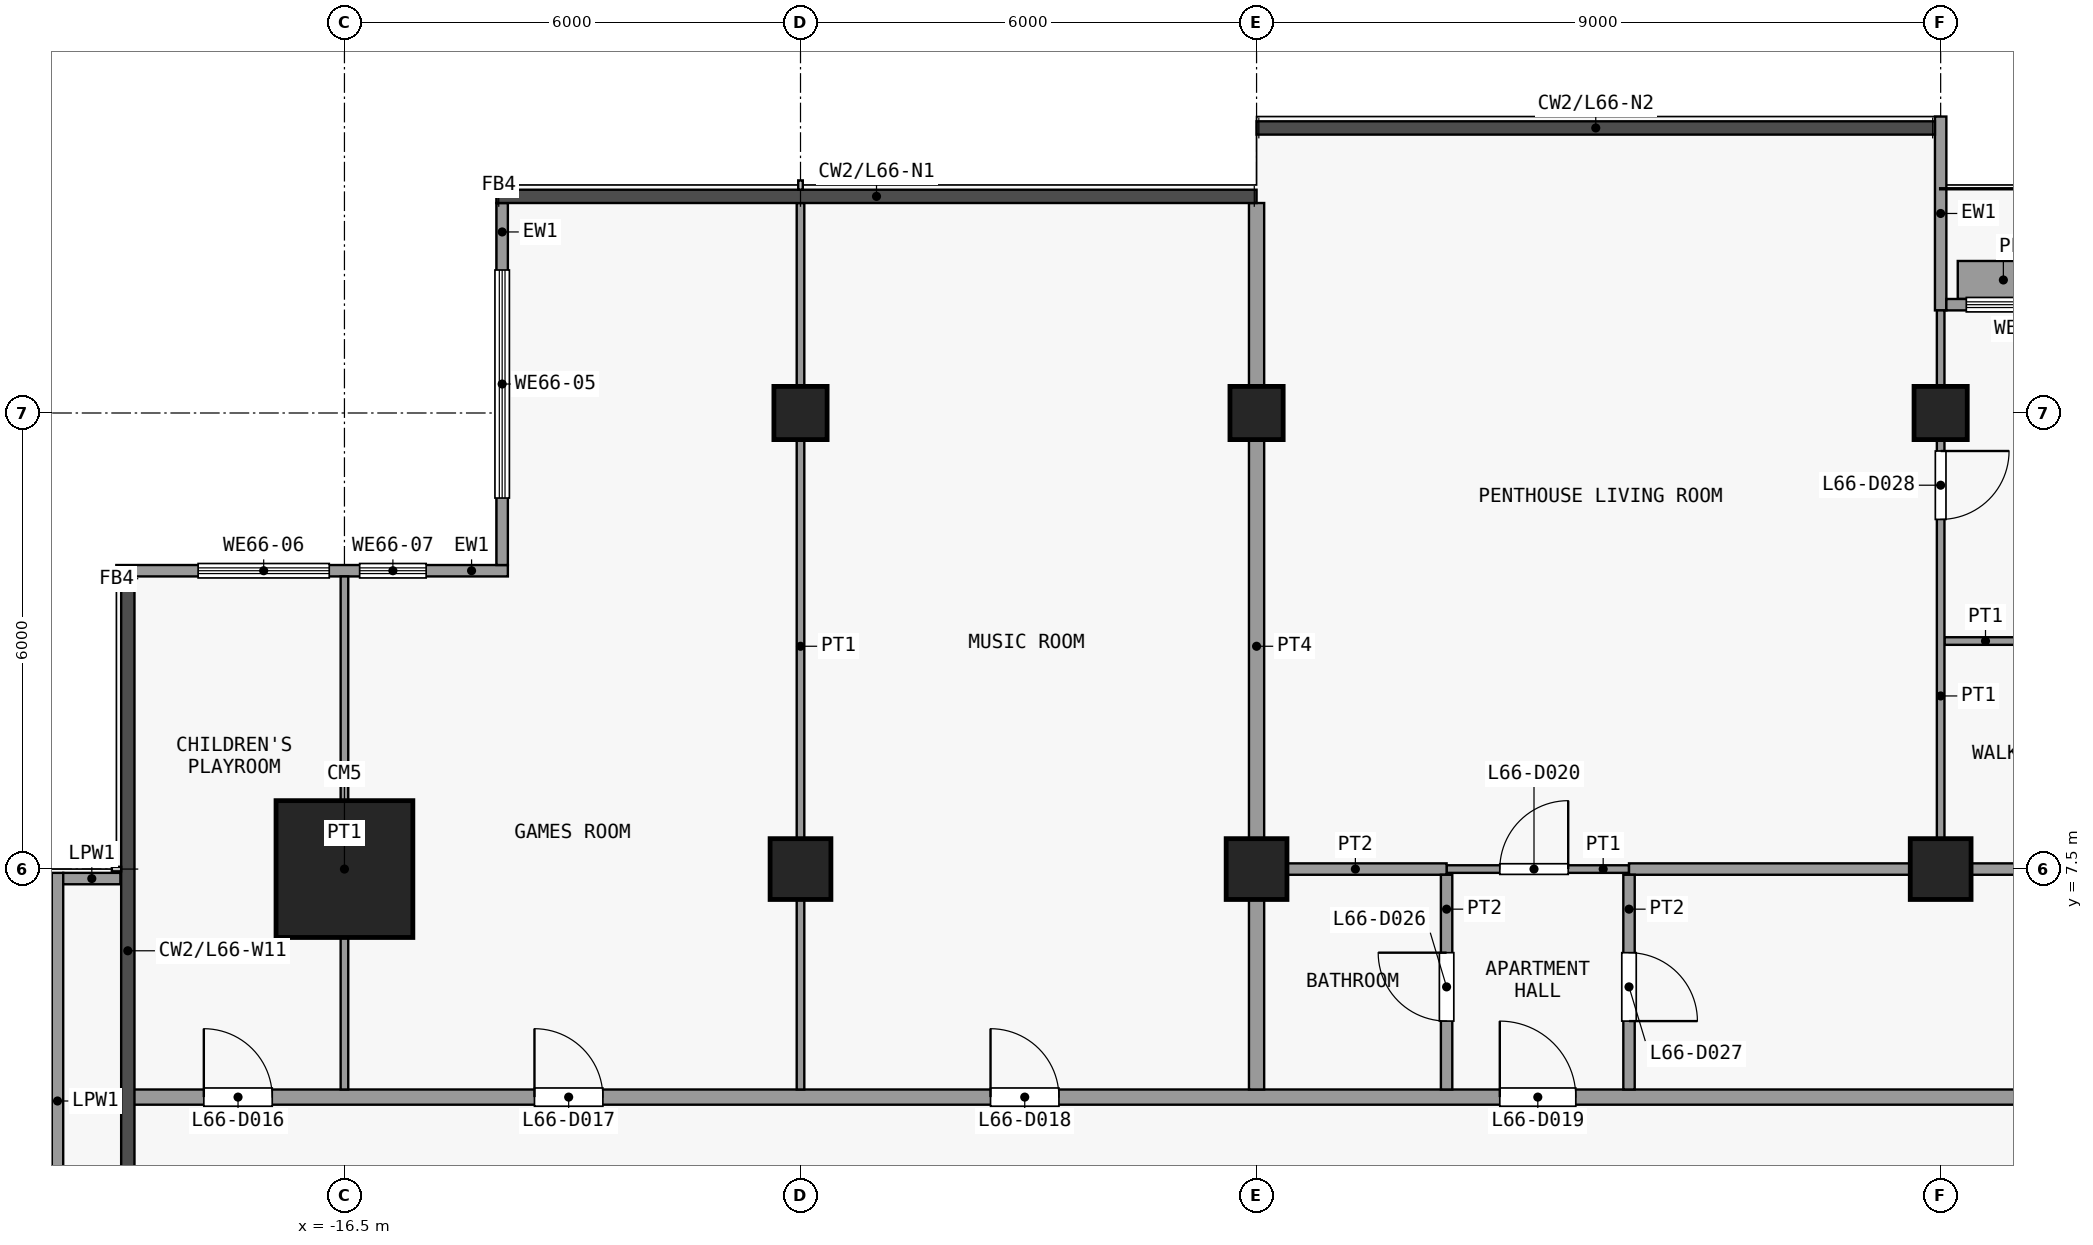
"""IFC4 building model, lengths in metres.
Left out: names, types, materials, properties, quantities, classifications, styles, units other than length and angle.
Written with IfcOpenShell. Run it as: python <this file> out.ifc"""

import sys

from ifc_helpers import new_model, si_unit, direction, frame, frame_2d, origin, origin_2d, place, context, subcontext, project, spatial, rectangle, extrude, element, fill, save


model = new_model("IFC4")
c1 = context("Model", 3, precision=1e-05, world=origin(), true_north=direction((0.0, 1.0)))
c2 = subcontext(c1, "Body", "Model", "MODEL_VIEW")
j1 = project(units=[si_unit("LENGTHUNIT", "METRE"), si_unit("PLANEANGLEUNIT", "RADIAN")], contexts=[c1])
p1 = place(None, origin())
s1 = spatial("IfcSite", under=j1, at=p1, CompositionType="ELEMENT")
p2 = place(p1, origin())
s2 = spatial("IfcBuilding", under=s1, at=p2, CompositionType="ELEMENT")
p3 = place(p2, frame((0.0, 0.0, 262.7)))
s3 = spatial("IfcBuildingStorey", under=s2, at=p3, CompositionType="ELEMENT", Elevation=262.7)
p4 = place(p3, frame((-16.5, 7.5, 0.0), z_axis=(0.0, 0.0, 1.0), x_axis=(1.0, 0.0, 0.0)))
e1 = element("IfcColumn", 1, at=p4, inside=s3, PredefinedType="COLUMN", context=c2, shape_type="SweptSolid", body=[
    extrude(rectangle(XDim=1.8, YDim=1.8, at=origin_2d()), origin(), (0.0, 0.0, 1.0), 3.6),
])
p5 = place(p3, frame((-10.5, 7.5, 0.0), z_axis=(0.0, 0.0, 1.0), x_axis=(1.0, 0.0, 0.0)))
e2 = element("IfcColumn", 2, at=p5, inside=s3, PredefinedType="COLUMN", context=c2, shape_type="SweptSolid", body=[
    extrude(rectangle(XDim=0.8, YDim=0.8, at=origin_2d()), origin(), (0.0, 0.0, 1.0), 3.6),
])
p6 = place(p3, frame((-10.5, 13.5, 0.0), z_axis=(0.0, 0.0, 1.0), x_axis=(1.0, 0.0, 0.0)))
e3 = element("IfcColumn", 3, at=p6, inside=s3, PredefinedType="COLUMN", context=c2, shape_type="SweptSolid", body=[
    extrude(rectangle(XDim=0.7, YDim=0.7, at=origin_2d()), origin(), (0.0, 0.0, 1.0), 3.6),
])
p7 = place(p3, frame((-4.5, 7.5, 0.0), z_axis=(0.0, 0.0, 1.0), x_axis=(1.0, 0.0, 0.0)))
e4 = element("IfcColumn", 4, at=p7, inside=s3, PredefinedType="COLUMN", context=c2, shape_type="SweptSolid", body=[
    extrude(rectangle(XDim=0.8, YDim=0.8, at=origin_2d()), origin(), (0.0, 0.0, 1.0), 3.6),
])
p8 = place(p3, frame((-4.5, 13.5, 0.0), z_axis=(0.0, 0.0, 1.0), x_axis=(1.0, 0.0, 0.0)))
e5 = element("IfcColumn", 5, at=p8, inside=s3, PredefinedType="COLUMN", context=c2, shape_type="SweptSolid", body=[
    extrude(rectangle(XDim=0.7, YDim=0.7, at=origin_2d()), origin(), (0.0, 0.0, 1.0), 3.6),
])
p9 = place(p3, frame((4.5, 7.5, 0.0), z_axis=(0.0, 0.0, 1.0), x_axis=(1.0, 0.0, 0.0)))
e6 = element("IfcColumn", 6, at=p9, inside=s3, PredefinedType="COLUMN", context=c2, shape_type="SweptSolid", body=[
    extrude(rectangle(XDim=0.8, YDim=0.8, at=origin_2d()), origin(), (0.0, 0.0, 1.0), 3.6),
])
p10 = place(p3, frame((4.5, 13.5, 0.0), z_axis=(0.0, 0.0, 1.0), x_axis=(1.0, 0.0, 0.0)))
e7 = element("IfcColumn", 7, at=p10, inside=s3, PredefinedType="COLUMN", context=c2, shape_type="SweptSolid", body=[
    extrude(rectangle(XDim=0.7, YDim=0.7, at=origin_2d()), origin(), (0.0, 0.0, 1.0), 3.6),
])
p11 = place(p3, frame((-14.425, 11.5, 0.0), z_axis=(0.0, 0.0, 1.0), x_axis=(0.0, 1.0, 0.0)))
e8 = element("IfcWall", 8, at=p11, inside=s3, PredefinedType="SOLIDWALL", context=c2, shape_type="SweptSolid", body=[
    extrude(rectangle(XDim=4.762, YDim=0.15, at=frame_2d((2.381, 0.0))), origin(), (0.0, 0.0, 1.0), 3.3),
])
p12 = place(p11, frame((0.881, 0.0, 0.9)))
e9 = element("IfcOpeningElement", 9, at=p12, cuts=e8, PredefinedType="OPENING", context=c2, shape_type="SweptSolid", body=[
    extrude(rectangle(XDim=3.0, YDim=2.4, at=frame_2d((1.5, 1.2))), frame((0.0, 0.085, 0.0), z_axis=(0.0, -1.0, 0.0), x_axis=(1.0, 0.0, 0.0)), (0.0, 0.0, 1.0), 0.17),
])
p13 = place(p3, frame((-19.5, 11.425, 0.0), z_axis=(0.0, 0.0, 1.0), x_axis=(1.0, 0.0, 0.0)))
e10 = element("IfcWall", 10, at=p13, inside=s3, PredefinedType="SOLIDWALL", context=c2, shape_type="SweptSolid", body=[
    extrude(rectangle(XDim=5.15, YDim=0.15, at=frame_2d((2.575, 0.0))), origin(), (0.0, 0.0, 1.0), 3.3),
])
p14 = place(p13, frame((1.075, 0.0, 0.9)))
e11 = element("IfcOpeningElement", 11, at=p14, cuts=e10, PredefinedType="OPENING", context=c2, shape_type="SweptSolid", body=[
    extrude(rectangle(XDim=1.725, YDim=2.4, at=frame_2d((0.863, 1.2))), frame((0.0, 0.085, 0.0), z_axis=(0.0, -1.0, 0.0), x_axis=(1.0, 0.0, 0.0)), (0.0, 0.0, 1.0), 0.17),
])
p15 = place(p13, frame((3.2, 0.0, 0.9)))
e12 = element("IfcOpeningElement", 12, at=p15, cuts=e10, PredefinedType="OPENING", context=c2, shape_type="SweptSolid", body=[
    extrude(rectangle(XDim=0.875, YDim=2.4, at=frame_2d((0.438, 1.2))), frame((0.0, 0.085, 0.0), z_axis=(0.0, -1.0, 0.0), x_axis=(1.0, 0.0, 0.0)), (0.0, 0.0, 1.0), 0.17),
])
p16 = place(p3, frame((4.5, 14.85, 0.0), z_axis=(0.0, 0.0, 1.0), x_axis=(0.0, 1.0, 0.0)))
e13 = element("IfcWall", 13, at=p16, inside=s3, PredefinedType="SOLIDWALL", context=c2, shape_type="SweptSolid", body=[
    extrude(rectangle(XDim=2.55, YDim=0.15, at=frame_2d((1.275, 0.0))), origin(), (0.0, 0.0, 1.0), 3.3),
])
p17 = place(p3, frame((4.575, 14.925, 0.0), z_axis=(0.0, 0.0, 1.0), x_axis=(1.0, 0.0, 0.0)))
e14 = element("IfcWall", 14, at=p17, inside=s3, PredefinedType="SOLIDWALL", context=c2, shape_type="SweptSolid", body=[
    extrude(rectangle(XDim=5.85, YDim=0.15, at=frame_2d((2.925, 0.0))), origin(), (0.0, 0.0, 1.0), 3.3),
])
p18 = place(p17, frame((2.325, 0.0, 0.0)))
e15 = element("IfcOpeningElement", 15, at=p18, cuts=e14, PredefinedType="OPENING", context=c2, shape_type="SweptSolid", body=[
    extrude(rectangle(XDim=1.2, YDim=2.4, at=frame_2d((0.6, 1.2))), frame((0.0, 0.085, 0.0), z_axis=(0.0, -1.0, 0.0), x_axis=(1.0, 0.0, 0.0)), (0.0, 0.0, 1.0), 0.17),
])
p19 = place(p17, frame((0.262, 0.0, 0.9)))
e16 = element("IfcOpeningElement", 16, at=p19, cuts=e14, PredefinedType="OPENING", context=c2, shape_type="SweptSolid", body=[
    extrude(rectangle(XDim=1.8, YDim=2.1, at=frame_2d((0.9, 1.05))), frame((0.0, 0.085, 0.0), z_axis=(0.0, -1.0, 0.0), x_axis=(1.0, 0.0, 0.0)), (0.0, 0.0, 1.0), 0.17),
])
p20 = place(p17, frame((3.788, 0.0, 0.9)))
e17 = element("IfcOpeningElement", 17, at=p20, cuts=e14, PredefinedType="OPENING", context=c2, shape_type="SweptSolid", body=[
    extrude(rectangle(XDim=1.8, YDim=2.1, at=frame_2d((0.9, 1.05))), frame((0.0, 0.085, 0.0), z_axis=(0.0, -1.0, 0.0), x_axis=(1.0, 0.0, 0.0)), (0.0, 0.0, 1.0), 0.17),
])
p21 = place(p3, frame((4.725, 15.25, 0.0), z_axis=(0.0, 0.0, 1.0), x_axis=(1.0, 0.0, 0.0)))
e18 = element("IfcWall", 18, at=p21, inside=s3, PredefinedType="USERDEFINED", context=c2, shape_type="SweptSolid", body=[
    extrude(rectangle(XDim=1.2, YDim=0.5, at=frame_2d((0.6, 0.0))), origin(), (0.0, 0.0, 1.0), 0.9),
])
p22 = place(p3, frame((-20.275, 1.448, 0.0), z_axis=(0.0, 0.0, 1.0), x_axis=(0.0, 1.0, 0.0)))
e19 = element("IfcWall", 19, at=p22, inside=s3, PredefinedType="PARAPET", context=c2, shape_type="SweptSolid", body=[
    extrude(rectangle(XDim=6.002, YDim=0.15, at=frame_2d((3.001, 0.0))), origin(), (0.0, 0.0, 1.0), 1.15),
])
p23 = place(p3, frame((-20.2, 7.375, 0.0), z_axis=(0.0, 0.0, 1.0), x_axis=(1.0, 0.0, 0.0)))
e20 = element("IfcWall", 20, at=p23, inside=s3, PredefinedType="PARAPET", context=c2, shape_type="SweptSolid", body=[
    extrude(rectangle(XDim=0.752, YDim=0.15, at=frame_2d((0.376, 0.0))), origin(), (0.0, 0.0, 1.0), 1.15),
])
p24 = place(p3, frame((-19.35, 4.5, 0.0), z_axis=(0.0, 0.0, 1.0), x_axis=(1.0, 0.0, 0.0)))
e21 = element("IfcWall", 21, at=p24, inside=s3, PredefinedType="PARTITIONING", context=c2, shape_type="SweptSolid", body=[
    extrude(rectangle(XDim=38.7, YDim=0.2, at=frame_2d((19.35, 0.0))), origin(), (0.0, 0.0, 1.0), 3.3),
])
p25 = place(p24, frame((1.0, 0.0, 0.0)))
e22 = element("IfcOpeningElement", 22, at=p25, cuts=e21, PredefinedType="OPENING", context=c2, shape_type="SweptSolid", body=[
    extrude(rectangle(XDim=0.9, YDim=2.1, at=frame_2d((0.45, 1.05))), frame((0.0, 0.11, 0.0), z_axis=(0.0, -1.0, 0.0), x_axis=(1.0, 0.0, 0.0)), (0.0, 0.0, 1.0), 0.22),
])
p26 = place(p24, frame((5.35, 0.0, 0.0)))
e23 = element("IfcOpeningElement", 23, at=p26, cuts=e21, PredefinedType="OPENING", context=c2, shape_type="SweptSolid", body=[
    extrude(rectangle(XDim=0.9, YDim=2.1, at=frame_2d((0.45, 1.05))), frame((0.0, 0.11, 0.0), z_axis=(0.0, -1.0, 0.0), x_axis=(1.0, 0.0, 0.0)), (0.0, 0.0, 1.0), 0.22),
])
p27 = place(p24, frame((11.35, 0.0, 0.0)))
e24 = element("IfcOpeningElement", 24, at=p27, cuts=e21, PredefinedType="OPENING", context=c2, shape_type="SweptSolid", body=[
    extrude(rectangle(XDim=0.9, YDim=2.1, at=frame_2d((0.45, 1.05))), frame((0.0, 0.11, 0.0), z_axis=(0.0, -1.0, 0.0), x_axis=(1.0, 0.0, 0.0)), (0.0, 0.0, 1.0), 0.22),
])
p28 = place(p24, frame((18.05, 0.0, 0.0)))
e25 = element("IfcOpeningElement", 25, at=p28, cuts=e21, PredefinedType="OPENING", context=c2, shape_type="SweptSolid", body=[
    extrude(rectangle(XDim=1.0, YDim=2.1, at=frame_2d((0.5, 1.05))), frame((0.0, 0.11, 0.0), z_axis=(0.0, -1.0, 0.0), x_axis=(1.0, 0.0, 0.0)), (0.0, 0.0, 1.0), 0.22),
])
p29 = place(p3, frame((-2.0, 7.5, 0.0), z_axis=(0.0, 0.0, 1.0), x_axis=(1.0, 0.0, 0.0)))
e26 = element("IfcWall", 26, at=p29, inside=s3, PredefinedType="PARTITIONING", context=c2, shape_type="SweptSolid", body=[
    extrude(rectangle(XDim=2.4, YDim=0.1, at=frame_2d((1.2, 0.0))), origin(), (0.0, 0.0, 1.0), 3.3),
])
p30 = place(p29, frame((0.7, 0.0, 0.0)))
e27 = element("IfcOpeningElement", 27, at=p30, cuts=e26, PredefinedType="OPENING", context=c2, shape_type="SweptSolid", body=[
    extrude(rectangle(XDim=0.9, YDim=2.1, at=frame_2d((0.45, 1.05))), frame((0.0, 0.06, 0.0), z_axis=(0.0, -1.0, 0.0), x_axis=(1.0, 0.0, 0.0)), (0.0, 0.0, 1.0), 0.12),
])
p31 = place(p3, frame((-4.4, 7.5, 0.0), z_axis=(0.0, 0.0, 1.0), x_axis=(1.0, 0.0, 0.0)))
e28 = element("IfcWall", 28, at=p31, inside=s3, PredefinedType="PARTITIONING", context=c2, shape_type="SweptSolid", body=[
    extrude(rectangle(XDim=2.4, YDim=0.15, at=frame_2d((1.2, 0.0))), origin(), (0.0, 0.0, 1.0), 3.3),
])
p32 = place(p3, frame((0.4, 7.5, 0.0), z_axis=(0.0, 0.0, 1.0), x_axis=(1.0, 0.0, 0.0)))
e29 = element("IfcWall", 29, at=p32, inside=s3, PredefinedType="PARTITIONING", context=c2, shape_type="SweptSolid", body=[
    extrude(rectangle(XDim=14.917, YDim=0.15, at=frame_2d((7.458, 0.0))), origin(), (0.0, 0.0, 1.0), 3.3),
])
p33 = place(p3, frame((4.55, 10.5, 0.0), z_axis=(0.0, 0.0, 1.0), x_axis=(1.0, 0.0, 0.0)))
e30 = element("IfcWall", 30, at=p33, inside=s3, PredefinedType="PARTITIONING", context=c2, shape_type="SweptSolid", body=[
    extrude(rectangle(XDim=3.25, YDim=0.1, at=frame_2d((1.625, 0.0))), origin(), (0.0, 0.0, 1.0), 3.3),
])
p34 = place(p33, frame((1.2, 0.0, 0.0)))
e31 = element("IfcOpeningElement", 31, at=p34, cuts=e30, PredefinedType="OPENING", context=c2, shape_type="SweptSolid", body=[
    extrude(rectangle(XDim=0.9, YDim=2.1, at=frame_2d((0.45, 1.05))), frame((0.0, 0.06, 0.0), z_axis=(0.0, -1.0, 0.0), x_axis=(1.0, 0.0, 0.0)), (0.0, 0.0, 1.0), 0.12),
])
p35 = place(p3, frame((-16.5, 4.6, 0.0), z_axis=(0.0, 0.0, 1.0), x_axis=(0.0, 1.0, 0.0)))
e32 = element("IfcWall", 32, at=p35, inside=s3, PredefinedType="PARTITIONING", context=c2, shape_type="SweptSolid", body=[
    extrude(rectangle(XDim=6.75, YDim=0.1, at=frame_2d((3.375, 0.0))), origin(), (0.0, 0.0, 1.0), 3.3),
])
p36 = place(p3, frame((-10.5, 4.6, 0.0), z_axis=(0.0, 0.0, 1.0), x_axis=(0.0, 1.0, 0.0)))
e33 = element("IfcWall", 33, at=p36, inside=s3, PredefinedType="PARTITIONING", context=c2, shape_type="SweptSolid", body=[
    extrude(rectangle(XDim=11.662, YDim=0.1, at=frame_2d((5.831, 0.0))), origin(), (0.0, 0.0, 1.0), 3.3),
])
p37 = place(p3, frame((-4.5, 4.6, 0.0), z_axis=(0.0, 0.0, 1.0), x_axis=(0.0, 1.0, 0.0)))
e34 = element("IfcWall", 34, at=p37, inside=s3, PredefinedType="PARTITIONING", context=c2, shape_type="SweptSolid", body=[
    extrude(rectangle(XDim=11.662, YDim=0.2, at=frame_2d((5.831, 0.0))), origin(), (0.0, 0.0, 1.0), 3.3),
])
p38 = place(p3, frame((-2.0, 4.6, 0.0), z_axis=(0.0, 0.0, 1.0), x_axis=(0.0, 1.0, 0.0)))
e35 = element("IfcWall", 35, at=p38, inside=s3, PredefinedType="PARTITIONING", context=c2, shape_type="SweptSolid", body=[
    extrude(rectangle(XDim=2.825, YDim=0.15, at=frame_2d((1.413, 0.0))), origin(), (0.0, 0.0, 1.0), 3.3),
])
p39 = place(p38, frame((0.9, 0.0, 0.0)))
e36 = element("IfcOpeningElement", 36, at=p39, cuts=e35, PredefinedType="OPENING", context=c2, shape_type="SweptSolid", body=[
    extrude(rectangle(XDim=0.9, YDim=2.1, at=frame_2d((0.45, 1.05))), frame((0.0, 0.085, 0.0), z_axis=(0.0, -1.0, 0.0), x_axis=(1.0, 0.0, 0.0)), (0.0, 0.0, 1.0), 0.17),
])
p40 = place(p3, frame((0.4, 4.6, 0.0), z_axis=(0.0, 0.0, 1.0), x_axis=(0.0, 1.0, 0.0)))
e37 = element("IfcWall", 37, at=p40, inside=s3, PredefinedType="PARTITIONING", context=c2, shape_type="SweptSolid", body=[
    extrude(rectangle(XDim=2.825, YDim=0.15, at=frame_2d((1.413, 0.0))), origin(), (0.0, 0.0, 1.0), 3.3),
])
p41 = place(p40, frame((0.9, 0.0, 0.0)))
e38 = element("IfcOpeningElement", 38, at=p41, cuts=e37, PredefinedType="OPENING", context=c2, shape_type="SweptSolid", body=[
    extrude(rectangle(XDim=0.9, YDim=2.1, at=frame_2d((0.45, 1.05))), frame((0.0, 0.085, 0.0), z_axis=(0.0, -1.0, 0.0), x_axis=(1.0, 0.0, 0.0)), (0.0, 0.0, 1.0), 0.17),
])
p42 = place(p3, frame((4.5, 7.575, 0.0), z_axis=(0.0, 0.0, 1.0), x_axis=(0.0, 1.0, 0.0)))
e39 = element("IfcWall", 39, at=p42, inside=s3, PredefinedType="PARTITIONING", context=c2, shape_type="SweptSolid", body=[
    extrude(rectangle(XDim=7.275, YDim=0.1, at=frame_2d((3.638, 0.0))), origin(), (0.0, 0.0, 1.0), 3.3),
])
p43 = place(p42, frame((4.525, 0.0, 0.0)))
e40 = element("IfcOpeningElement", 40, at=p43, cuts=e39, PredefinedType="OPENING", context=c2, shape_type="SweptSolid", body=[
    extrude(rectangle(XDim=0.9, YDim=2.1, at=frame_2d((0.45, 1.05))), frame((0.0, 0.06, 0.0), z_axis=(0.0, -1.0, 0.0), x_axis=(1.0, 0.0, 0.0)), (0.0, 0.0, 1.0), 0.12),
])
p44 = place(p12, origin())
e41 = element("IfcWindow", 41, at=p44, inside=s3, PartitioningType="SINGLE_PANEL", PredefinedType="WINDOW", context=c2, shape_type="SweptSolid", body=[
    extrude(rectangle(XDim=3.0, YDim=2.4, at=frame_2d((1.5, 1.2))), frame((0.0, 0.03, 0.0), z_axis=(0.0, -1.0, 0.0), x_axis=(1.0, 0.0, 0.0)), (0.0, 0.0, 1.0), 0.06),
])
fill(e9, e41)
p45 = place(p14, origin())
e42 = element("IfcWindow", 42, at=p45, inside=s3, PartitioningType="SINGLE_PANEL", PredefinedType="WINDOW", context=c2, shape_type="SweptSolid", body=[
    extrude(rectangle(XDim=1.725, YDim=2.4, at=frame_2d((0.863, 1.2))), frame((0.0, 0.03, 0.0), z_axis=(0.0, -1.0, 0.0), x_axis=(1.0, 0.0, 0.0)), (0.0, 0.0, 1.0), 0.06),
])
fill(e11, e42)
p46 = place(p15, origin())
e43 = element("IfcWindow", 43, at=p46, inside=s3, PartitioningType="SINGLE_PANEL", PredefinedType="WINDOW", context=c2, shape_type="SweptSolid", body=[
    extrude(rectangle(XDim=0.875, YDim=2.4, at=frame_2d((0.438, 1.2))), frame((0.0, 0.03, 0.0), z_axis=(0.0, -1.0, 0.0), x_axis=(1.0, 0.0, 0.0)), (0.0, 0.0, 1.0), 0.06),
])
fill(e12, e43)
p47 = place(p19, origin())
e44 = element("IfcWindow", 44, at=p47, inside=s3, PartitioningType="SINGLE_PANEL", PredefinedType="WINDOW", context=c2, shape_type="SweptSolid", body=[
    extrude(rectangle(XDim=1.8, YDim=2.1, at=frame_2d((0.9, 1.05))), frame((0.0, 0.03, 0.0), z_axis=(0.0, -1.0, 0.0), x_axis=(1.0, 0.0, 0.0)), (0.0, 0.0, 1.0), 0.06),
])
fill(e16, e44)
p48 = place(p25, origin())
e45 = element("IfcDoor", 45, at=p48, inside=s3, OperationType="SINGLE_SWING_RIGHT", PredefinedType="DOOR", context=c2, shape_type="SweptSolid", body=[
    extrude(rectangle(XDim=0.9, YDim=2.1, at=frame_2d((0.45, 1.05))), frame((0.0, 0.025, 0.0), z_axis=(0.0, -1.0, 0.0), x_axis=(1.0, 0.0, 0.0)), (0.0, 0.0, 1.0), 0.05),
])
fill(e22, e45)
p49 = place(p26, origin())
e46 = element("IfcDoor", 46, at=p49, inside=s3, OperationType="SINGLE_SWING_RIGHT", PredefinedType="DOOR", context=c2, shape_type="SweptSolid", body=[
    extrude(rectangle(XDim=0.9, YDim=2.1, at=frame_2d((0.45, 1.05))), frame((0.0, 0.025, 0.0), z_axis=(0.0, -1.0, 0.0), x_axis=(1.0, 0.0, 0.0)), (0.0, 0.0, 1.0), 0.05),
])
fill(e23, e46)
p50 = place(p27, origin())
e47 = element("IfcDoor", 47, at=p50, inside=s3, OperationType="SINGLE_SWING_RIGHT", PredefinedType="DOOR", context=c2, shape_type="SweptSolid", body=[
    extrude(rectangle(XDim=0.9, YDim=2.1, at=frame_2d((0.45, 1.05))), frame((0.0, 0.025, 0.0), z_axis=(0.0, -1.0, 0.0), x_axis=(1.0, 0.0, 0.0)), (0.0, 0.0, 1.0), 0.05),
])
fill(e24, e47)
p51 = place(p28, origin())
e48 = element("IfcDoor", 48, at=p51, inside=s3, OperationType="SINGLE_SWING_RIGHT", PredefinedType="DOOR", context=c2, shape_type="SweptSolid", body=[
    extrude(rectangle(XDim=1.0, YDim=2.1, at=frame_2d((0.5, 1.05))), frame((0.0, 0.025, 0.0), z_axis=(0.0, -1.0, 0.0), x_axis=(1.0, 0.0, 0.0)), (0.0, 0.0, 1.0), 0.05),
])
fill(e25, e48)
p52 = place(p30, origin())
e49 = element("IfcDoor", 49, at=p52, inside=s3, OperationType="SINGLE_SWING_LEFT", PredefinedType="DOOR", context=c2, shape_type="SweptSolid", body=[
    extrude(rectangle(XDim=0.9, YDim=2.1, at=frame_2d((0.45, 1.05))), frame((0.0, 0.025, 0.0), z_axis=(0.0, -1.0, 0.0), x_axis=(1.0, 0.0, 0.0)), (0.0, 0.0, 1.0), 0.05),
])
fill(e27, e49)
p53 = place(p39, origin())
e50 = element("IfcDoor", 50, at=p53, inside=s3, OperationType="SINGLE_SWING_LEFT", PredefinedType="DOOR", context=c2, shape_type="SweptSolid", body=[
    extrude(rectangle(XDim=0.9, YDim=2.1, at=frame_2d((0.45, 1.05))), frame((0.0, 0.025, 0.0), z_axis=(0.0, -1.0, 0.0), x_axis=(1.0, 0.0, 0.0)), (0.0, 0.0, 1.0), 0.05),
])
fill(e36, e50)
p54 = place(p41, origin())
e51 = element("IfcDoor", 51, at=p54, inside=s3, OperationType="SINGLE_SWING_LEFT", PredefinedType="DOOR", context=c2, shape_type="SweptSolid", body=[
    extrude(rectangle(XDim=0.9, YDim=2.1, at=frame_2d((0.45, 1.05))), frame((0.0, 0.025, 0.0), z_axis=(0.0, -1.0, 0.0), x_axis=(1.0, 0.0, 0.0)), (0.0, 0.0, 1.0), 0.05),
])
fill(e38, e51)
p55 = place(p43, origin())
e52 = element("IfcDoor", 52, at=p55, inside=s3, OperationType="SINGLE_SWING_RIGHT", PredefinedType="DOOR", context=c2, shape_type="SweptSolid", body=[
    extrude(rectangle(XDim=0.9, YDim=2.1, at=frame_2d((0.45, 1.05))), frame((0.0, 0.025, 0.0), z_axis=(0.0, -1.0, 0.0), x_axis=(1.0, 0.0, 0.0)), (0.0, 0.0, 1.0), 0.05),
])
fill(e40, e52)
save(model, sys.argv[1])
